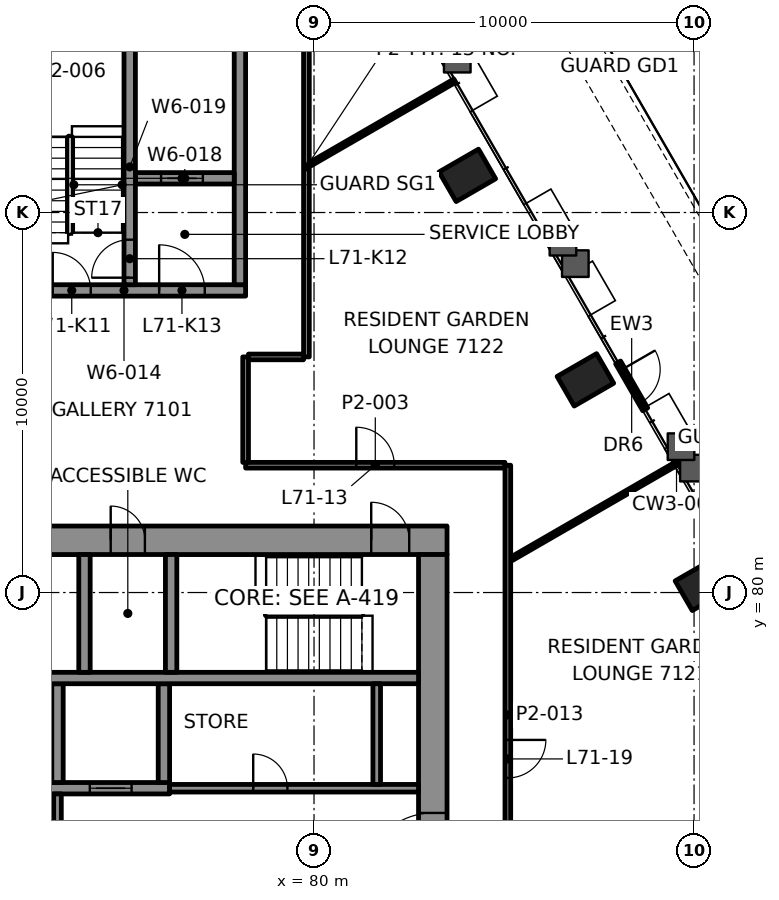
"""IFC4 building model, lengths in metres.
Left out: names, types, materials, properties, quantities, classifications, styles, units other than length and angle.
Written with IfcOpenShell. Run it as: python <this file> out.ifc"""

import sys

from ifc_helpers import new_model, si_unit, direction, frame, frame_2d, origin, origin_2d, place, context, subcontext, project, spatial, rectangle, hollow_rectangle, extrude, element, fill, save


model = new_model("IFC4")
c1 = context("Model", 3, precision=1e-05, world=origin(), true_north=direction((0.0, 1.0)))
c2 = subcontext(c1, "Body", "Model", "MODEL_VIEW")
j1 = project(units=[si_unit("LENGTHUNIT", "METRE"), si_unit("PLANEANGLEUNIT", "RADIAN")], contexts=[c1])
p1 = place(None, origin())
s1 = spatial("IfcSite", under=j1, at=p1, CompositionType="ELEMENT")
p2 = place(p1, origin())
s2 = spatial("IfcBuilding", under=s1, at=p2, CompositionType="ELEMENT")
p3 = place(p2, frame((0.0, 0.0, 295.1)))
s3 = spatial("IfcBuildingStorey", under=s2, at=p3, CompositionType="ELEMENT", Elevation=295.1)
for number, where, z_axis, x_axis in (
    (1, (90.247, 80.216, -0.0), (0.0, 0.0, 1.0), (-0.5, 0.866, 0.0)),
    (2, (87.141, 85.597, -0.0), (0.0, 0.0, 1.0), (-0.5, 0.866, 0.0)),
    (3, (84.034, 90.978, -0.0), (0.0, 0.0, 1.0), (-0.5, 0.866, 0.0)),
):
    element("IfcColumn", number, at=place(p3, frame(where, z_axis=z_axis, x_axis=x_axis)), inside=s3, PredefinedType="COLUMN", context=c2, shape_type="SweptSolid", body=[
        extrude(hollow_rectangle(XDim=0.9, YDim=1.2, WallThickness=0.06, at=origin_2d()), origin(), (0.0, 0.0, 1.0), 3.5),
    ])
p4 = place(p3, frame((66.5, 81.375, 0.0), z_axis=(0.0, 0.0, 1.0), x_axis=(1.0, 0.0, 0.0)))
e4 = element("IfcWall", 4, at=p4, inside=s3, PredefinedType="SHEAR", context=c2, shape_type="SweptSolid", body=[
    extrude(rectangle(XDim=17.0, YDim=0.75, at=frame_2d((8.5, 0.0))), origin(), (0.0, 0.0, 1.0), 3.3),
])
p5 = place(p4, frame((1.195, 0.0, 0.0)))
e5 = element("IfcOpeningElement", 5, at=p5, cuts=e4, PredefinedType="OPENING", context=c2, shape_type="SweptSolid", body=[
    extrude(rectangle(XDim=1.0, YDim=2.1, at=frame_2d((0.5, 1.05))), frame((0.0, 0.385, 0.0), z_axis=(0.0, -1.0, 0.0), x_axis=(1.0, 0.0, 0.0)), (0.0, 0.0, 1.0), 0.77),
])
p6 = place(p4, frame((15.005, 0.0, 0.0)))
e6 = element("IfcOpeningElement", 6, at=p6, cuts=e4, PredefinedType="OPENING", context=c2, shape_type="SweptSolid", body=[
    extrude(rectangle(XDim=1.0, YDim=2.1, at=frame_2d((0.5, 1.05))), frame((0.0, 0.385, 0.0), z_axis=(0.0, -1.0, 0.0), x_axis=(1.0, 0.0, 0.0)), (0.0, 0.0, 1.0), 0.77),
])
p7 = place(p4, frame((8.15, 0.0, 0.0)))
e7 = element("IfcOpeningElement", 7, at=p7, cuts=e4, PredefinedType="OPENING", context=c2, shape_type="SweptSolid", body=[
    extrude(rectangle(XDim=0.9, YDim=2.1, at=frame_2d((0.45, 1.05))), frame((0.0, 0.385, 0.0), z_axis=(0.0, -1.0, 0.0), x_axis=(1.0, 0.0, 0.0)), (0.0, 0.0, 1.0), 0.77),
])
p8 = place(p3, frame((83.125, 69.0, 0.0), z_axis=(0.0, 0.0, 1.0), x_axis=(0.0, 1.0, 0.0)))
e8 = element("IfcWall", 8, at=p8, inside=s3, PredefinedType="SHEAR", context=c2, shape_type="SweptSolid", body=[
    extrude(rectangle(XDim=12.0, YDim=0.75, at=frame_2d((6.0, 0.0))), origin(), (0.0, 0.0, 1.0), 3.3),
])
p9 = place(p8, frame((3.4, 0.0, 0.0)))
e9 = element("IfcOpeningElement", 9, at=p9, cuts=e8, PredefinedType="OPENING", context=c2, shape_type="SweptSolid", body=[
    extrude(rectangle(XDim=1.8, YDim=2.1, at=frame_2d((0.9, 1.05))), frame((0.0, 0.385, 0.0), z_axis=(0.0, -1.0, 0.0), x_axis=(1.0, 0.0, 0.0)), (0.0, 0.0, 1.0), 0.77),
])
p10 = place(p3, frame((70.3, 74.85, 0.0), z_axis=(0.0, 0.0, 1.0), x_axis=(1.0, 0.0, 0.0)))
e10 = element("IfcWall", 10, at=p10, inside=s3, PredefinedType="SHEAR", context=c2, shape_type="SweptSolid", body=[
    extrude(rectangle(XDim=5.9, YDim=0.3, at=frame_2d((2.95, 0.0))), origin(), (0.0, 0.0, 1.0), 3.3),
])
p11 = place(p10, frame((3.8, 0.0, 0.0)))
e11 = element("IfcOpeningElement", 11, at=p11, cuts=e10, PredefinedType="OPENING", context=c2, shape_type="SweptSolid", body=[
    extrude(rectangle(XDim=1.1, YDim=2.1, at=frame_2d((0.55, 1.05))), frame((0.0, 0.16, 0.0), z_axis=(0.0, -1.0, 0.0), x_axis=(1.0, 0.0, 0.0)), (0.0, 0.0, 1.0), 0.32),
])
for number, where, z_axis, x_axis in (
    (12, (73.25, 75.0, 0.0), (0.0, 0.0, 1.0), (0.0, 1.0, 0.0)),
    (13, (76.05, 75.0, 0.0), (0.0, 0.0, 1.0), (0.0, 1.0, 0.0)),
):
    element("IfcWall", number, at=place(p3, frame(where, z_axis=z_axis, x_axis=x_axis)), inside=s3, PredefinedType="SHEAR", context=c2, shape_type="SweptSolid", body=[
        extrude(rectangle(XDim=2.6, YDim=0.3, at=frame_2d((1.3, 0.0))), origin(), (0.0, 0.0, 1.0), 3.3),
    ])
p12 = place(p3, frame((67.25, 77.75, 0.0), z_axis=(0.0, 0.0, 1.0), x_axis=(1.0, 0.0, 0.0)))
e14 = element("IfcWall", 14, at=p12, inside=s3, PredefinedType="SHEAR", context=c2, shape_type="SweptSolid", body=[
    extrude(rectangle(XDim=15.5, YDim=0.3, at=frame_2d((7.75, 0.0))), origin(), (0.0, 0.0, 1.0), 3.3),
])
p13 = place(p12, frame((0.445, 0.0, 0.0)))
e15 = element("IfcOpeningElement", 15, at=p13, cuts=e14, PredefinedType="OPENING", context=c2, shape_type="SweptSolid", body=[
    extrude(rectangle(XDim=1.0, YDim=2.1, at=frame_2d((0.5, 1.05))), frame((0.0, 0.16, 0.0), z_axis=(0.0, -1.0, 0.0), x_axis=(1.0, 0.0, 0.0)), (0.0, 0.0, 1.0), 0.32),
])
for number, where, z_axis, x_axis in (
    (16, (73.96, 77.9, 0.0), (0.0, 0.0, 1.0), (0.0, 1.0, 0.0)),
    (17, (76.24, 77.9, 0.0), (0.0, 0.0, 1.0), (0.0, 1.0, 0.0)),
):
    element("IfcWall", number, at=place(p3, frame(where, z_axis=z_axis, x_axis=x_axis)), inside=s3, PredefinedType="SHEAR", context=c2, shape_type="SweptSolid", body=[
        extrude(rectangle(XDim=3.1, YDim=0.3, at=frame_2d((1.55, 0.0))), origin(), (0.0, 0.0, 1.0), 3.3),
    ])
p14 = place(p3, frame((71.8, 87.95, 0.0), z_axis=(0.0, 0.0, 1.0), x_axis=(1.0, 0.0, 0.0)))
e18 = element("IfcWall", 18, at=p14, inside=s3, PredefinedType="SHEAR", context=c2, shape_type="SweptSolid", body=[
    extrude(rectangle(XDim=6.4, YDim=0.3, at=frame_2d((3.2, 0.0))), origin(), (0.0, 0.0, 1.0), 3.3),
])
p15 = place(p14, frame((1.325, 0.0, 0.0)))
e19 = element("IfcOpeningElement", 19, at=p15, cuts=e18, PredefinedType="OPENING", context=c2, shape_type="SweptSolid", body=[
    extrude(rectangle(XDim=1.0, YDim=2.1, at=frame_2d((0.5, 1.05))), frame((0.0, 0.16, 0.0), z_axis=(0.0, -1.0, 0.0), x_axis=(1.0, 0.0, 0.0)), (0.0, 0.0, 1.0), 0.32),
])
p16 = place(p14, frame((4.125, 0.0, 0.0)))
e20 = element("IfcOpeningElement", 20, at=p16, cuts=e18, PredefinedType="OPENING", context=c2, shape_type="SweptSolid", body=[
    extrude(rectangle(XDim=1.2, YDim=2.1, at=frame_2d((0.6, 1.05))), frame((0.0, 0.16, 0.0), z_axis=(0.0, -1.0, 0.0), x_axis=(1.0, 0.0, 0.0)), (0.0, 0.0, 1.0), 0.32),
])
p17 = place(p3, frame((78.05, 88.1, 0.0), z_axis=(0.0, 0.0, 1.0), x_axis=(0.0, 1.0, 0.0)))
e21 = element("IfcWall", 21, at=p17, inside=s3, PredefinedType="SHEAR", context=c2, shape_type="SweptSolid", body=[
    extrude(rectangle(XDim=6.2, YDim=0.3, at=frame_2d((3.1, 0.0))), origin(), (0.0, 0.0, 1.0), 3.3),
])
p18 = place(p3, frame((75.3, 90.9, 0.0), z_axis=(0.0, 0.0, 1.0), x_axis=(1.0, 0.0, 0.0)))
e22 = element("IfcWall", 22, at=p18, inside=s3, PredefinedType="SHEAR", context=c2, shape_type="SweptSolid", body=[
    extrude(rectangle(XDim=2.6, YDim=0.3, at=frame_2d((1.3, 0.0))), origin(), (0.0, 0.0, 1.0), 3.3),
])
p19 = place(p18, frame((0.675, 0.0, 0.0)))
e23 = element("IfcOpeningElement", 23, at=p19, cuts=e22, PredefinedType="OPENING", context=c2, shape_type="SweptSolid", body=[
    extrude(rectangle(XDim=1.1, YDim=2.1, at=frame_2d((0.55, 1.05))), frame((0.0, 0.16, 0.0), z_axis=(0.0, -1.0, 0.0), x_axis=(1.0, 0.0, 0.0)), (0.0, 0.0, 1.0), 0.32),
])
p20 = place(p3, frame((75.15, 88.1, 0.0), z_axis=(0.0, 0.0, 1.0), x_axis=(0.0, 1.0, 0.0)))
e24 = element("IfcWall", 24, at=p20, inside=s3, PredefinedType="SHEAR", context=c2, shape_type="SweptSolid", body=[
    extrude(rectangle(XDim=6.2, YDim=0.3, at=frame_2d((3.1, 0.0))), origin(), (0.0, 0.0, 1.0), 3.3),
])
p21 = place(p20, frame((0.185, 0.0, 0.0)))
e25 = element("IfcOpeningElement", 25, at=p21, cuts=e24, PredefinedType="OPENING", context=c2, shape_type="SweptSolid", body=[
    extrude(rectangle(XDim=1.0, YDim=2.1, at=frame_2d((0.5, 1.05))), frame((0.0, 0.16, 0.0), z_axis=(0.0, -1.0, 0.0), x_axis=(1.0, 0.0, 0.0)), (0.0, 0.0, 1.0), 0.32),
])
p22 = place(p3, frame((78.2, 83.35, 0.0), z_axis=(0.0, 0.0, 1.0), x_axis=(1.0, 0.0, 0.0)))
e26 = element("IfcWall", 26, at=p22, inside=s3, PredefinedType="PARTITIONING", context=c2, shape_type="SweptSolid", body=[
    extrude(rectangle(XDim=6.824, YDim=0.15, at=frame_2d((3.412, 0.0))), origin(), (0.0, 0.0, 1.0), 2.7),
])
p23 = place(p22, frame((2.912, 0.0, 0.0)))
e27 = element("IfcOpeningElement", 27, at=p23, cuts=e26, PredefinedType="OPENING", context=c2, shape_type="SweptSolid", body=[
    extrude(rectangle(XDim=1.0, YDim=2.1, at=frame_2d((0.5, 1.05))), frame((0.0, 0.085, 0.0), z_axis=(0.0, -1.0, 0.0), x_axis=(1.0, 0.0, 0.0)), (0.0, 0.0, 1.0), 0.17),
])
p24 = place(p3, frame((78.275, 86.2, 0.0), z_axis=(0.0, 0.0, 1.0), x_axis=(1.0, 0.0, 0.0)))
e28 = element("IfcWall", 28, at=p24, inside=s3, PredefinedType="PARTITIONING", context=c2, shape_type="SweptSolid", body=[
    extrude(rectangle(XDim=1.45, YDim=0.15, at=frame_2d((0.725, 0.0))), origin(), (0.0, 0.0, 1.0), 2.7),
])
p25 = place(p3, frame((85.201, 80.89, 0.0), z_axis=(0.0, 0.0, 1.0), x_axis=(0.866025995923, 0.499998974385, 0.0)))
e29 = element("IfcWall", 29, at=p25, inside=s3, PredefinedType="PARTITIONING", context=c2, shape_type="SweptSolid", body=[
    extrude(rectangle(XDim=4.993, YDim=0.1, at=frame_2d((2.497, 0.0))), origin(), (0.0, 0.0, 1.0), 2.688),
])
p26 = place(p3, frame((79.901, 91.274, 0.0), z_axis=(0.0, 0.0, 1.0), x_axis=(0.86602077629, 0.50000801497, 0.0)))
e30 = element("IfcWall", 30, at=p26, inside=s3, PredefinedType="PARTITIONING", context=c2, shape_type="SweptSolid", body=[
    extrude(rectangle(XDim=4.391, YDim=0.1, at=frame_2d((2.196, 0.0))), origin(), (0.0, 0.0, 1.0), 2.7),
])
p27 = place(p3, frame((85.1, 83.35, 0.0), z_axis=(0.0, 0.0, 1.0), x_axis=(0.0, -1.0, 0.0)))
e31 = element("IfcWall", 31, at=p27, inside=s3, PredefinedType="PARTITIONING", context=c2, shape_type="SweptSolid", body=[
    extrude(rectangle(XDim=13.142, YDim=0.15, at=frame_2d((6.571, 0.0))), origin(), (0.0, 0.0, 1.0), 2.7),
])
p28 = place(p27, frame((7.228, 0.0, 0.0)))
e32 = element("IfcOpeningElement", 32, at=p28, cuts=e31, PredefinedType="OPENING", context=c2, shape_type="SweptSolid", body=[
    extrude(rectangle(XDim=1.0, YDim=2.1, at=frame_2d((0.5, 1.05))), frame((0.0, 0.085, 0.0), z_axis=(0.0, -1.0, 0.0), x_axis=(1.0, 0.0, 0.0)), (0.0, 0.0, 1.0), 0.17),
])
p29 = place(p3, frame((79.8, 86.2, 0.0), z_axis=(0.0, 0.0, 1.0), x_axis=(0.0, 1.0, 0.0)))
e33 = element("IfcWall", 33, at=p29, inside=s3, PredefinedType="PARTITIONING", context=c2, shape_type="SweptSolid", body=[
    extrude(rectangle(XDim=9.999, YDim=0.15, at=frame_2d((5.0, 0.0))), origin(), (0.0, 0.0, 1.0), 2.7),
])
p30 = place(p3, frame((78.2, 83.425, 0.0), z_axis=(0.0, 0.0, 1.0), x_axis=(0.0, 1.0, 0.0)))
e34 = element("IfcWall", 34, at=p30, inside=s3, PredefinedType="PARTITIONING", context=c2, shape_type="SweptSolid", body=[
    extrude(rectangle(XDim=2.775, YDim=0.15, at=frame_2d((1.387, 0.0))), origin(), (0.0, 0.0, 1.0), 2.697),
])
p31 = place(p3, frame((90.75, 88.045, 0.0), z_axis=(0.0, 0.0, 1.0), x_axis=(-0.50000302904, 0.86602365496, 0.0)))
e35 = element("IfcWall", 35, at=p31, inside=s3, PredefinedType="SOLIDWALL", context=c2, shape_type="SweptSolid", body=[
    extrude(rectangle(XDim=19.734, YDim=0.8, at=frame_2d((9.867, 0.0))), origin(), (0.0, 0.0, 1.0), 0.9),
])
p32 = place(p3, frame((76.2, 74.85, 0.0), z_axis=(0.0, 0.0, 1.0), x_axis=(1.0, 0.0, 0.0)))
e36 = element("IfcWall", 36, at=p32, inside=s3, PredefinedType="PARTITIONING", context=c2, shape_type="SweptSolid", body=[
    extrude(rectangle(XDim=6.55, YDim=0.2, at=frame_2d((3.275, 0.0))), origin(), (0.0, 0.0, 1.0), 3.3),
])
p33 = place(p32, frame((2.2, 0.0, 0.0)))
e37 = element("IfcOpeningElement", 37, at=p33, cuts=e36, PredefinedType="OPENING", context=c2, shape_type="SweptSolid", body=[
    extrude(rectangle(XDim=0.9, YDim=2.1, at=frame_2d((0.45, 1.05))), frame((0.0, 0.11, 0.0), z_axis=(0.0, -1.0, 0.0), x_axis=(1.0, 0.0, 0.0)), (0.0, 0.0, 1.0), 0.22),
])
p34 = place(p3, frame((73.25, 71.9, 0.0), z_axis=(0.0, 0.0, 1.0), x_axis=(0.0, 1.0, 0.0)))
e38 = element("IfcWall", 38, at=p34, inside=s3, PredefinedType="PARTITIONING", context=c2, shape_type="SweptSolid", body=[
    extrude(rectangle(XDim=2.8, YDim=0.2, at=frame_2d((1.4, 0.0))), origin(), (0.0, 0.0, 1.0), 3.3),
])
p35 = place(p34, frame((0.8, 0.0, 0.0)))
e39 = element("IfcOpeningElement", 39, at=p35, cuts=e38, PredefinedType="OPENING", context=c2, shape_type="SweptSolid", body=[
    extrude(rectangle(XDim=1.2, YDim=2.1, at=frame_2d((0.6, 1.05))), frame((0.0, 0.11, 0.0), z_axis=(0.0, -1.0, 0.0), x_axis=(1.0, 0.0, 0.0)), (0.0, 0.0, 1.0), 0.22),
])
p36 = place(p3, frame((81.65, 74.95, 0.0), z_axis=(0.0, 0.0, 1.0), x_axis=(0.0, 1.0, 0.0)))
e40 = element("IfcWall", 40, at=p36, inside=s3, PredefinedType="PARTITIONING", context=c2, shape_type="SweptSolid", body=[
    extrude(rectangle(XDim=2.65, YDim=0.2, at=frame_2d((1.325, 0.0))), origin(), (0.0, 0.0, 1.0), 3.3),
])
p37 = place(p23, origin())
e41 = element("IfcDoor", 41, at=p37, inside=s3, OperationType="SINGLE_SWING_LEFT", PredefinedType="DOOR", context=c2, shape_type="SweptSolid", body=[
    extrude(rectangle(XDim=1.0, YDim=2.1, at=frame_2d((0.5, 1.05))), frame((0.0, 0.025, 0.0), z_axis=(0.0, -1.0, 0.0), x_axis=(1.0, 0.0, 0.0)), (0.0, 0.0, 1.0), 0.05),
])
fill(e27, e41)
p38 = place(p28, origin())
e42 = element("IfcDoor", 42, at=p38, inside=s3, OperationType="SINGLE_SWING_LEFT", PredefinedType="DOOR", context=c2, shape_type="SweptSolid", body=[
    extrude(rectangle(XDim=1.0, YDim=2.1, at=frame_2d((0.5, 1.05))), frame((0.0, 0.025, 0.0), z_axis=(0.0, -1.0, 0.0), x_axis=(1.0, 0.0, 0.0)), (0.0, 0.0, 1.0), 0.05),
])
fill(e32, e42)
p39 = place(p3, frame((88.002, 86.055, 0.0), z_axis=(0.0, 0.0, 1.0), x_axis=(0.499841041413, -0.866117159118, 0.0)))
p40 = place(p39, frame((0.213, 0.0, 0.0)))
p41 = place(p40, origin())
e43 = element("IfcDoor", 43, at=p41, inside=s3, OperationType="SINGLE_SWING_LEFT", PredefinedType="DOOR", context=c2, shape_type="SweptSolid", body=[
    extrude(rectangle(XDim=1.0, YDim=2.1, at=frame_2d((0.5, 1.05))), frame((0.0, 0.025, 0.0), z_axis=(0.0, -1.0, 0.0), x_axis=(1.0, 0.0, 0.0)), (0.0, 0.0, 1.0), 0.05),
])
p42 = place(p11, origin())
e44 = element("IfcDoor", 44, at=p42, inside=s3, OperationType="DOUBLE_DOOR_SLIDING", PredefinedType="DOOR", context=c2, shape_type="SweptSolid", body=[
    extrude(rectangle(XDim=1.1, YDim=2.1, at=frame_2d((0.55, 1.05))), frame((0.0, 0.025, 0.0), z_axis=(0.0, -1.0, 0.0), x_axis=(1.0, 0.0, 0.0)), (0.0, 0.0, 1.0), 0.05),
])
fill(e11, e44)
p43 = place(p19, origin())
e45 = element("IfcDoor", 45, at=p43, inside=s3, OperationType="DOUBLE_DOOR_SLIDING", PredefinedType="DOOR", context=c2, shape_type="SweptSolid", body=[
    extrude(rectangle(XDim=1.1, YDim=2.1, at=frame_2d((0.55, 1.05))), frame((0.0, 0.025, 0.0), z_axis=(0.0, -1.0, 0.0), x_axis=(1.0, 0.0, 0.0)), (0.0, 0.0, 1.0), 0.05),
])
fill(e23, e45)
p44 = place(p6, origin())
e46 = element("IfcDoor", 46, at=p44, inside=s3, OperationType="SINGLE_SWING_LEFT", PredefinedType="DOOR", context=c2, shape_type="SweptSolid", body=[
    extrude(rectangle(XDim=1.0, YDim=2.1, at=frame_2d((0.5, 1.05))), frame((0.0, 0.095, 0.0), z_axis=(0.0, -1.0, 0.0), x_axis=(1.0, 0.0, 0.0)), (0.0, 0.0, 1.0), 0.19),
])
fill(e6, e46)
p45 = place(p15, origin())
e47 = element("IfcDoor", 47, at=p45, inside=s3, OperationType="SINGLE_SWING_RIGHT", PredefinedType="DOOR", context=c2, shape_type="SweptSolid", body=[
    extrude(rectangle(XDim=1.0, YDim=2.1, at=frame_2d((0.5, 1.05))), frame((0.0, 0.025, 0.0), z_axis=(0.0, -1.0, 0.0), x_axis=(1.0, 0.0, 0.0)), (0.0, 0.0, 1.0), 0.05),
])
fill(e19, e47)
p46 = place(p21, origin())
e48 = element("IfcDoor", 48, at=p46, inside=s3, OperationType="SINGLE_SWING_LEFT", PredefinedType="DOOR", context=c2, shape_type="SweptSolid", body=[
    extrude(rectangle(XDim=1.0, YDim=2.1, at=frame_2d((0.5, 1.05))), frame((0.0, 0.025, 0.0), z_axis=(0.0, -1.0, 0.0), x_axis=(1.0, 0.0, 0.0)), (0.0, 0.0, 1.0), 0.05),
])
fill(e25, e48)
p47 = place(p16, origin())
e49 = element("IfcDoor", 49, at=p47, inside=s3, OperationType="SINGLE_SWING_RIGHT", PredefinedType="DOOR", context=c2, shape_type="SweptSolid", body=[
    extrude(rectangle(XDim=1.2, YDim=2.1, at=frame_2d((0.6, 1.05))), frame((0.0, 0.025, 0.0), z_axis=(0.0, -1.0, 0.0), x_axis=(1.0, 0.0, 0.0)), (0.0, 0.0, 1.0), 0.05),
])
fill(e20, e49)
p48 = place(p9, origin())
e50 = element("IfcDoor", 50, at=p48, inside=s3, OperationType="SINGLE_SWING_LEFT", PredefinedType="DOOR", context=c2, shape_type="SweptSolid", body=[
    extrude(rectangle(XDim=1.8, YDim=2.1, at=frame_2d((0.9, 1.05))), frame((0.0, 0.095, 0.0), z_axis=(0.0, -1.0, 0.0), x_axis=(1.0, 0.0, 0.0)), (0.0, 0.0, 1.0), 0.19),
])
fill(e9, e50)
p49 = place(p33, origin())
e51 = element("IfcDoor", 51, at=p49, inside=s3, OperationType="SINGLE_SWING_LEFT", PredefinedType="DOOR", context=c2, shape_type="SweptSolid", body=[
    extrude(rectangle(XDim=0.9, YDim=2.1, at=frame_2d((0.45, 1.05))), frame((0.0, 0.025, 0.0), z_axis=(0.0, -1.0, 0.0), x_axis=(1.0, 0.0, 0.0)), (0.0, 0.0, 1.0), 0.05),
])
fill(e37, e51)
p50 = place(p7, origin())
e52 = element("IfcDoor", 52, at=p50, inside=s3, OperationType="SINGLE_SWING_RIGHT", PredefinedType="DOOR", context=c2, shape_type="SweptSolid", body=[
    extrude(rectangle(XDim=0.9, YDim=2.1, at=frame_2d((0.45, 1.05))), frame((0.0, 0.095, 0.0), z_axis=(0.0, -1.0, 0.0), x_axis=(1.0, 0.0, 0.0)), (0.0, 0.0, 1.0), 0.19),
])
fill(e7, e52)
save(model, sys.argv[1])
